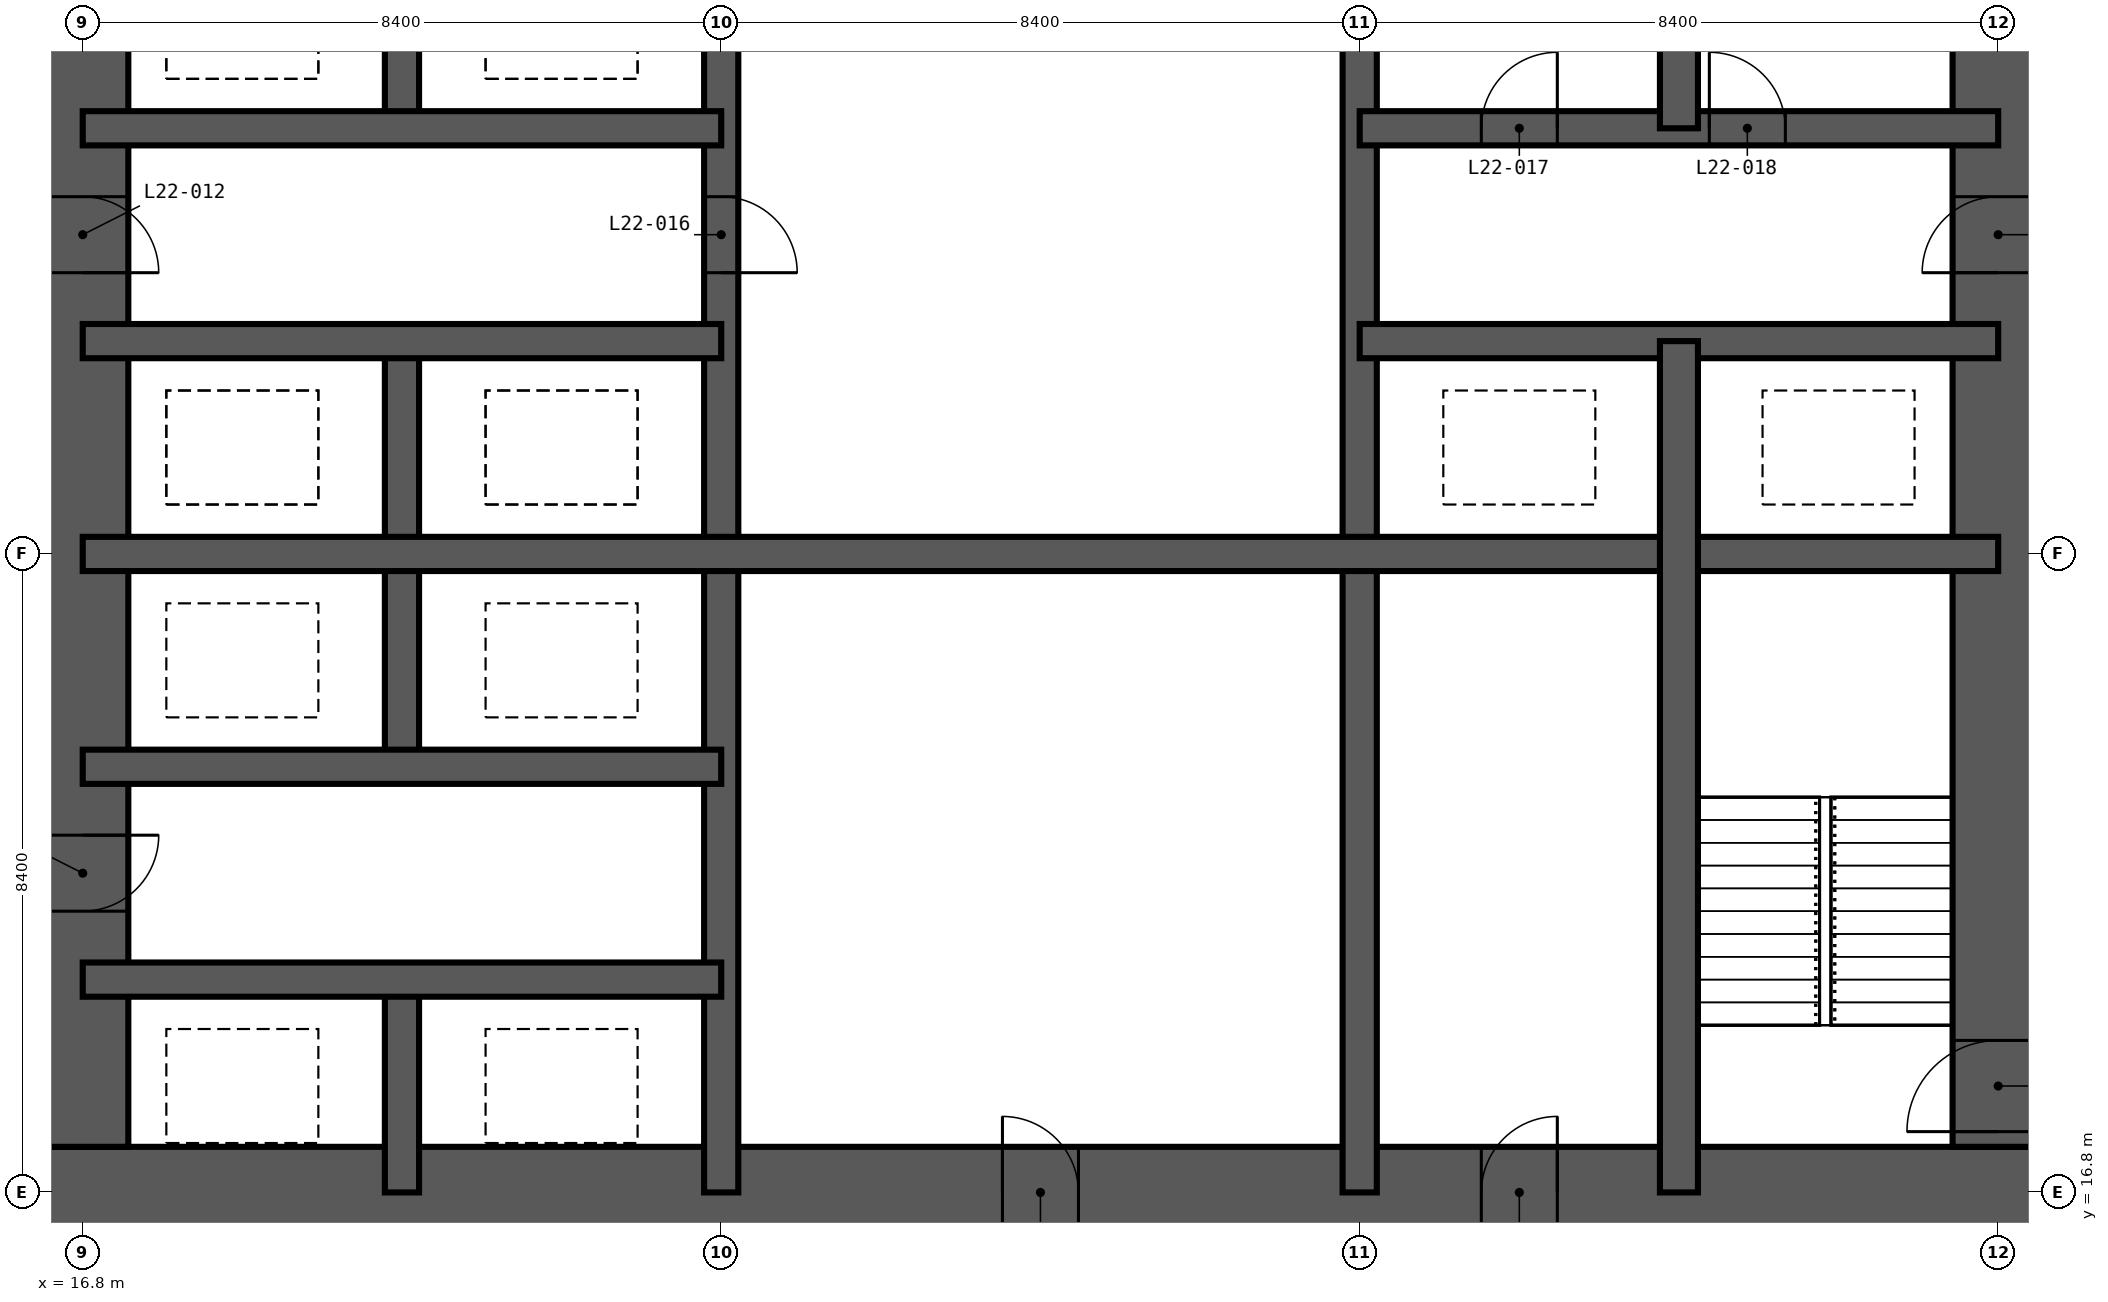
"""IFC4 building model, lengths in metres.
Left out: names, types, materials, properties, quantities, classifications, styles, units other than length and angle.
Written with IfcOpenShell. Run it as: python <this file> out.ifc"""

import sys

from ifc_helpers import new_model, si_unit, direction, frame, frame_2d, origin, place, context, subcontext, project, spatial, rectangle, extrude, element, fill, save


model = new_model("IFC4")
c1 = context("Model", 3, precision=1e-05, world=origin(), true_north=direction((0.0, 1.0)))
c2 = subcontext(c1, "Body", "Model", "MODEL_VIEW")
j1 = project(units=[si_unit("LENGTHUNIT", "METRE"), si_unit("PLANEANGLEUNIT", "RADIAN")], contexts=[c1])
p1 = place(None, origin())
s1 = spatial("IfcSite", under=j1, at=p1, CompositionType="ELEMENT")
p2 = place(p1, origin())
s2 = spatial("IfcBuilding", under=s1, at=p2, CompositionType="ELEMENT")
p3 = place(p2, frame((0.0, 0.0, 88.2)))
s3 = spatial("IfcBuildingStorey", under=s2, at=p3, CompositionType="ELEMENT", Elevation=88.2)
p4 = place(p3, frame((16.2, 16.8, -0.4), z_axis=(0.0, 0.0, 1.0), x_axis=(1.0, 0.0, 0.0)))
e1 = element("IfcWall", 1, at=p4, inside=s3, PredefinedType="SHEAR", context=c2, shape_type="SweptSolid", body=[
    extrude(rectangle(XDim=26.4, YDim=1.2, at=frame_2d((13.2, 0.0))), origin(), (0.0, 0.0, 1.0), 5.45),
])
p5 = place(p4, frame((12.7, 0.0, 0.4)))
e2 = element("IfcOpeningElement", 2, at=p5, cuts=e1, PredefinedType="OPENING", context=c2, shape_type="SweptSolid", body=[
    extrude(rectangle(XDim=1.0, YDim=2.1, at=frame_2d((0.5, 1.05))), frame((0.0, 0.61, 0.0), z_axis=(0.0, -1.0, 0.0), x_axis=(1.0, 0.0, 0.0)), (0.0, 0.0, 1.0), 1.22),
])
p6 = place(p4, frame((19.0, 0.0, 0.4)))
e3 = element("IfcOpeningElement", 3, at=p6, cuts=e1, PredefinedType="OPENING", context=c2, shape_type="SweptSolid", body=[
    extrude(rectangle(XDim=1.0, YDim=2.1, at=frame_2d((0.5, 1.05))), frame((0.0, 0.61, 0.0), z_axis=(0.0, -1.0, 0.0), x_axis=(1.0, 0.0, 0.0)), (0.0, 0.0, 1.0), 1.22),
])
p7 = place(p3, frame((42.0, 17.4, -0.4), z_axis=(0.0, 0.0, 1.0), x_axis=(0.0, 1.0, 0.0)))
e4 = element("IfcWall", 4, at=p7, inside=s3, PredefinedType="SHEAR", context=c2, shape_type="SweptSolid", body=[
    extrude(rectangle(XDim=24.0, YDim=1.2, at=frame_2d((12.0, 0.0))), origin(), (0.0, 0.0, 1.0), 5.45),
])
p8 = place(p7, frame((0.2, 0.0, 0.4)))
e5 = element("IfcOpeningElement", 5, at=p8, cuts=e4, PredefinedType="OPENING", context=c2, shape_type="SweptSolid", body=[
    extrude(rectangle(XDim=1.2, YDim=2.2, at=frame_2d((0.6, 1.1))), frame((0.0, 0.61, 0.0), z_axis=(0.0, -1.0, 0.0), x_axis=(1.0, 0.0, 0.0)), (0.0, 0.0, 1.0), 1.22),
])
p9 = place(p7, frame((11.5, 0.0, 0.4)))
e6 = element("IfcOpeningElement", 6, at=p9, cuts=e4, PredefinedType="OPENING", context=c2, shape_type="SweptSolid", body=[
    extrude(rectangle(XDim=1.0, YDim=2.1, at=frame_2d((0.5, 1.05))), frame((0.0, 0.61, 0.0), z_axis=(0.0, -1.0, 0.0), x_axis=(1.0, 0.0, 0.0)), (0.0, 0.0, 1.0), 1.22),
])
p10 = place(p7, frame((19.9, 0.0, 0.4)))
e7 = element("IfcOpeningElement", 7, at=p10, cuts=e4, PredefinedType="OPENING", context=c2, shape_type="SweptSolid", body=[
    extrude(rectangle(XDim=1.0, YDim=2.1, at=frame_2d((0.5, 1.05))), frame((0.0, 0.61, 0.0), z_axis=(0.0, -1.0, 0.0), x_axis=(1.0, 0.0, 0.0)), (0.0, 0.0, 1.0), 1.22),
])
p11 = place(p3, frame((16.8, 41.4, -0.4), z_axis=(0.0, 0.0, 1.0), x_axis=(0.0, -1.0, 0.0)))
e8 = element("IfcWall", 8, at=p11, inside=s3, PredefinedType="SHEAR", context=c2, shape_type="SweptSolid", body=[
    extrude(rectangle(XDim=24.0, YDim=1.2, at=frame_2d((12.0, 0.0))), origin(), (0.0, 0.0, 1.0), 5.45),
])
p12 = place(p11, frame((11.5, 0.0, 0.4)))
e9 = element("IfcOpeningElement", 9, at=p12, cuts=e8, PredefinedType="OPENING", context=c2, shape_type="SweptSolid", body=[
    extrude(rectangle(XDim=1.0, YDim=2.1, at=frame_2d((0.5, 1.05))), frame((0.0, 0.61, 0.0), z_axis=(0.0, -1.0, 0.0), x_axis=(1.0, 0.0, 0.0)), (0.0, 0.0, 1.0), 1.22),
])
p13 = place(p11, frame((19.9, 0.0, 0.4)))
e10 = element("IfcOpeningElement", 10, at=p13, cuts=e8, PredefinedType="OPENING", context=c2, shape_type="SweptSolid", body=[
    extrude(rectangle(XDim=1.0, YDim=2.1, at=frame_2d((0.5, 1.05))), frame((0.0, 0.61, 0.0), z_axis=(0.0, -1.0, 0.0), x_axis=(1.0, 0.0, 0.0)), (0.0, 0.0, 1.0), 1.22),
])
p14 = place(p11, frame((5.2, 0.0, 0.4)))
e11 = element("IfcOpeningElement", 11, at=p14, cuts=e8, PredefinedType="OPENING", context=c2, shape_type="SweptSolid", body=[
    extrude(rectangle(XDim=1.0, YDim=2.1, at=frame_2d((0.5, 1.05))), frame((0.0, 0.61, 0.0), z_axis=(0.0, -1.0, 0.0), x_axis=(1.0, 0.0, 0.0)), (0.0, 0.0, 1.0), 1.22),
])
p15 = place(p3, frame((21.0, 16.8, -0.4), z_axis=(0.0, 0.0, 1.0), x_axis=(0.0, 1.0, 0.0)))
e12 = element("IfcWall", 12, at=p15, inside=s3, PredefinedType="SHEAR", context=c2, shape_type="SweptSolid", body=[
    extrude(rectangle(XDim=2.8, YDim=0.45, at=frame_2d((1.4, 0.0))), origin(), (0.0, 0.0, 1.0), 5.45),
])
p16 = place(p3, frame((21.0, 22.4, -0.4), z_axis=(0.0, 0.0, 1.0), x_axis=(0.0, 1.0, 0.0)))
e13 = element("IfcWall", 13, at=p16, inside=s3, PredefinedType="SHEAR", context=c2, shape_type="SweptSolid", body=[
    extrude(rectangle(XDim=5.6, YDim=0.45, at=frame_2d((2.8, 0.0))), origin(), (0.0, 0.0, 1.0), 5.45),
])
p17 = place(p3, frame((21.0, 30.8, -0.4), z_axis=(0.0, 0.0, 1.0), x_axis=(0.0, 1.0, 0.0)))
e14 = element("IfcWall", 14, at=p17, inside=s3, PredefinedType="SHEAR", context=c2, shape_type="SweptSolid", body=[
    extrude(rectangle(XDim=2.8, YDim=0.45, at=frame_2d((1.4, 0.0))), origin(), (0.0, 0.0, 1.0), 5.45),
])
p18 = place(p3, frame((25.2, 16.8, -0.4), z_axis=(0.0, 0.0, 1.0), x_axis=(0.0, 1.0, 0.0)))
e15 = element("IfcWall", 15, at=p18, inside=s3, PredefinedType="SHEAR", context=c2, shape_type="SweptSolid", body=[
    extrude(rectangle(XDim=25.2, YDim=0.45, at=frame_2d((12.6, 0.0))), origin(), (0.0, 0.0, 1.0), 5.45),
])
p19 = place(p18, frame((12.1, 0.0, 0.4)))
e16 = element("IfcOpeningElement", 16, at=p19, cuts=e15, PredefinedType="OPENING", context=c2, shape_type="SweptSolid", body=[
    extrude(rectangle(XDim=1.0, YDim=2.1, at=frame_2d((0.5, 1.05))), frame((0.0, 0.235, 0.0), z_axis=(0.0, -1.0, 0.0), x_axis=(1.0, 0.0, 0.0)), (0.0, 0.0, 1.0), 0.47),
])
p20 = place(p3, frame((33.6, 16.8, -0.4), z_axis=(0.0, 0.0, 1.0), x_axis=(0.0, 1.0, 0.0)))
e17 = element("IfcWall", 17, at=p20, inside=s3, PredefinedType="SHEAR", context=c2, shape_type="SweptSolid", body=[
    extrude(rectangle(XDim=25.2, YDim=0.45, at=frame_2d((12.6, 0.0))), origin(), (0.0, 0.0, 1.0), 5.45),
])
p21 = place(p20, frame((22.5, 0.0, 0.4)))
e18 = element("IfcOpeningElement", 18, at=p21, cuts=e17, PredefinedType="OPENING", context=c2, shape_type="SweptSolid", body=[
    extrude(rectangle(XDim=1.2, YDim=2.2, at=frame_2d((0.6, 1.1))), frame((0.0, 0.235, 0.0), z_axis=(0.0, -1.0, 0.0), x_axis=(1.0, 0.0, 0.0)), (0.0, 0.0, 1.0), 0.47),
])
p22 = place(p20, frame((18.3, 0.0, 0.4)))
e19 = element("IfcOpeningElement", 19, at=p22, cuts=e17, PredefinedType="OPENING", context=c2, shape_type="SweptSolid", body=[
    extrude(rectangle(XDim=1.2, YDim=2.2, at=frame_2d((0.6, 1.1))), frame((0.0, 0.235, 0.0), z_axis=(0.0, -1.0, 0.0), x_axis=(1.0, 0.0, 0.0)), (0.0, 0.0, 1.0), 0.47),
])
for number, where, z_axis, x_axis in (
    (20, (16.8, 19.6, -0.4), (0.0, 0.0, 1.0), (1.0, 0.0, 0.0)),
    (21, (16.8, 22.4, -0.4), (0.0, 0.0, 1.0), (1.0, 0.0, 0.0)),
):
    element("IfcWall", number, at=place(p3, frame(where, z_axis=z_axis, x_axis=x_axis)), inside=s3, PredefinedType="SHEAR", context=c2, shape_type="SweptSolid", body=[
        extrude(rectangle(XDim=8.4, YDim=0.45, at=frame_2d((4.2, 0.0))), origin(), (0.0, 0.0, 1.0), 5.45),
    ])
p23 = place(p3, frame((16.8, 25.2, -0.4), z_axis=(0.0, 0.0, 1.0), x_axis=(1.0, 0.0, 0.0)))
e22 = element("IfcWall", 22, at=p23, inside=s3, PredefinedType="SHEAR", context=c2, shape_type="SweptSolid", body=[
    extrude(rectangle(XDim=25.2, YDim=0.45, at=frame_2d((12.6, 0.0))), origin(), (0.0, 0.0, 1.0), 5.45),
])
for number, where, z_axis, x_axis in (
    (23, (16.8, 28.0, -0.4), (0.0, 0.0, 1.0), (1.0, 0.0, 0.0)),
    (24, (33.6, 28.0, -0.4), (0.0, 0.0, 1.0), (1.0, 0.0, 0.0)),
    (25, (16.8, 30.8, -0.4), (0.0, 0.0, 1.0), (1.0, 0.0, 0.0)),
):
    element("IfcWall", number, at=place(p3, frame(where, z_axis=z_axis, x_axis=x_axis)), inside=s3, PredefinedType="SHEAR", context=c2, shape_type="SweptSolid", body=[
        extrude(rectangle(XDim=8.4, YDim=0.45, at=frame_2d((4.2, 0.0))), origin(), (0.0, 0.0, 1.0), 5.45),
    ])
p24 = place(p3, frame((33.6, 30.8, -0.4), z_axis=(0.0, 0.0, 1.0), x_axis=(1.0, 0.0, 0.0)))
e26 = element("IfcWall", 26, at=p24, inside=s3, PredefinedType="SHEAR", context=c2, shape_type="SweptSolid", body=[
    extrude(rectangle(XDim=8.4, YDim=0.45, at=frame_2d((4.2, 0.0))), origin(), (0.0, 0.0, 1.0), 5.45),
])
p25 = place(p24, frame((1.6, 0.0, 0.4)))
e27 = element("IfcOpeningElement", 27, at=p25, cuts=e26, PredefinedType="OPENING", context=c2, shape_type="SweptSolid", body=[
    extrude(rectangle(XDim=1.0, YDim=2.1, at=frame_2d((0.5, 1.05))), frame((0.0, 0.235, 0.0), z_axis=(0.0, -1.0, 0.0), x_axis=(1.0, 0.0, 0.0)), (0.0, 0.0, 1.0), 0.47),
])
p26 = place(p24, frame((4.6, 0.0, 0.4)))
e28 = element("IfcOpeningElement", 28, at=p26, cuts=e26, PredefinedType="OPENING", context=c2, shape_type="SweptSolid", body=[
    extrude(rectangle(XDim=1.0, YDim=2.1, at=frame_2d((0.5, 1.05))), frame((0.0, 0.235, 0.0), z_axis=(0.0, -1.0, 0.0), x_axis=(1.0, 0.0, 0.0)), (0.0, 0.0, 1.0), 0.47),
])
p27 = place(p3, frame((37.8, 16.8, -0.4), z_axis=(0.0, 0.0, 1.0), x_axis=(0.0, 1.0, 0.0)))
e29 = element("IfcWall", 29, at=p27, inside=s3, PredefinedType="SHEAR", context=c2, shape_type="SweptSolid", body=[
    extrude(rectangle(XDim=11.2, YDim=0.5, at=frame_2d((5.6, 0.0))), origin(), (0.0, 0.0, 1.0), 5.45),
])
p28 = place(p3, frame((37.8, 30.8, -0.4), z_axis=(0.0, 0.0, 1.0), x_axis=(0.0, 1.0, 0.0)))
e30 = element("IfcWall", 30, at=p28, inside=s3, PredefinedType="SHEAR", context=c2, shape_type="SweptSolid", body=[
    extrude(rectangle(XDim=2.8, YDim=0.5, at=frame_2d((1.4, 0.0))), origin(), (0.0, 0.0, 1.0), 5.45),
])
p29 = place(p8, origin())
e31 = element("IfcDoor", 31, at=p29, inside=s3, OperationType="SINGLE_SWING_LEFT", PredefinedType="DOOR", context=c2, shape_type="SweptSolid", body=[
    extrude(rectangle(XDim=1.2, YDim=2.2, at=frame_2d((0.6, 1.1))), frame((0.0, 0.025, 0.0), z_axis=(0.0, -1.0, 0.0), x_axis=(1.0, 0.0, 0.0)), (0.0, 0.0, 1.0), 0.05),
])
fill(e5, e31)
p30 = place(p12, origin())
e32 = element("IfcDoor", 32, at=p30, inside=s3, OperationType="SINGLE_SWING_RIGHT", PredefinedType="DOOR", context=c2, shape_type="SweptSolid", body=[
    extrude(rectangle(XDim=1.0, YDim=2.1, at=frame_2d((0.5, 1.05))), frame((0.0, 0.025, 0.0), z_axis=(0.0, -1.0, 0.0), x_axis=(1.0, 0.0, 0.0)), (0.0, 0.0, 1.0), 0.05),
])
fill(e9, e32)
p31 = place(p13, origin())
e33 = element("IfcDoor", 33, at=p31, inside=s3, OperationType="SINGLE_SWING_LEFT", PredefinedType="DOOR", context=c2, shape_type="SweptSolid", body=[
    extrude(rectangle(XDim=1.0, YDim=2.1, at=frame_2d((0.5, 1.05))), frame((0.0, 0.025, 0.0), z_axis=(0.0, -1.0, 0.0), x_axis=(1.0, 0.0, 0.0)), (0.0, 0.0, 1.0), 0.05),
])
fill(e10, e33)
p32 = place(p19, frame((1.0, 0.0, 0.0), z_axis=(0.0, 0.0, 1.0), x_axis=(-1.0, 0.0, 0.0)))
e34 = element("IfcDoor", 34, at=p32, inside=s3, OperationType="SINGLE_SWING_RIGHT", PredefinedType="DOOR", context=c2, shape_type="SweptSolid", body=[
    extrude(rectangle(XDim=1.0, YDim=2.1, at=frame_2d((0.5, 1.05))), frame((0.0, 0.025, 0.0), z_axis=(0.0, -1.0, 0.0), x_axis=(1.0, 0.0, 0.0)), (0.0, 0.0, 1.0), 0.05),
])
fill(e16, e34)
p33 = place(p25, origin())
e35 = element("IfcDoor", 35, at=p33, inside=s3, OperationType="SINGLE_SWING_RIGHT", PredefinedType="DOOR", context=c2, shape_type="SweptSolid", body=[
    extrude(rectangle(XDim=1.0, YDim=2.1, at=frame_2d((0.5, 1.05))), frame((0.0, 0.025, 0.0), z_axis=(0.0, -1.0, 0.0), x_axis=(1.0, 0.0, 0.0)), (0.0, 0.0, 1.0), 0.05),
])
fill(e27, e35)
p34 = place(p26, origin())
e36 = element("IfcDoor", 36, at=p34, inside=s3, OperationType="SINGLE_SWING_LEFT", PredefinedType="DOOR", context=c2, shape_type="SweptSolid", body=[
    extrude(rectangle(XDim=1.0, YDim=2.1, at=frame_2d((0.5, 1.05))), frame((0.0, 0.025, 0.0), z_axis=(0.0, -1.0, 0.0), x_axis=(1.0, 0.0, 0.0)), (0.0, 0.0, 1.0), 0.05),
])
fill(e28, e36)
p35 = place(p9, origin())
e37 = element("IfcDoor", 37, at=p35, inside=s3, OperationType="SINGLE_SWING_LEFT", PredefinedType="DOOR", context=c2, shape_type="SweptSolid", body=[
    extrude(rectangle(XDim=1.0, YDim=2.1, at=frame_2d((0.5, 1.05))), frame((0.0, 0.025, 0.0), z_axis=(0.0, -1.0, 0.0), x_axis=(1.0, 0.0, 0.0)), (0.0, 0.0, 1.0), 0.05),
])
fill(e6, e37)
p36 = place(p5, origin())
e38 = element("IfcDoor", 38, at=p36, inside=s3, OperationType="SINGLE_SWING_LEFT", PredefinedType="DOOR", context=c2, shape_type="SweptSolid", body=[
    extrude(rectangle(XDim=1.0, YDim=2.1, at=frame_2d((0.5, 1.05))), frame((0.0, 0.025, 0.0), z_axis=(0.0, -1.0, 0.0), x_axis=(1.0, 0.0, 0.0)), (0.0, 0.0, 1.0), 0.05),
])
fill(e2, e38)
p37 = place(p6, origin())
e39 = element("IfcDoor", 39, at=p37, inside=s3, OperationType="SINGLE_SWING_RIGHT", PredefinedType="DOOR", context=c2, shape_type="SweptSolid", body=[
    extrude(rectangle(XDim=1.0, YDim=2.1, at=frame_2d((0.5, 1.05))), frame((0.0, 0.025, 0.0), z_axis=(0.0, -1.0, 0.0), x_axis=(1.0, 0.0, 0.0)), (0.0, 0.0, 1.0), 0.05),
])
fill(e3, e39)
save(model, sys.argv[1])
